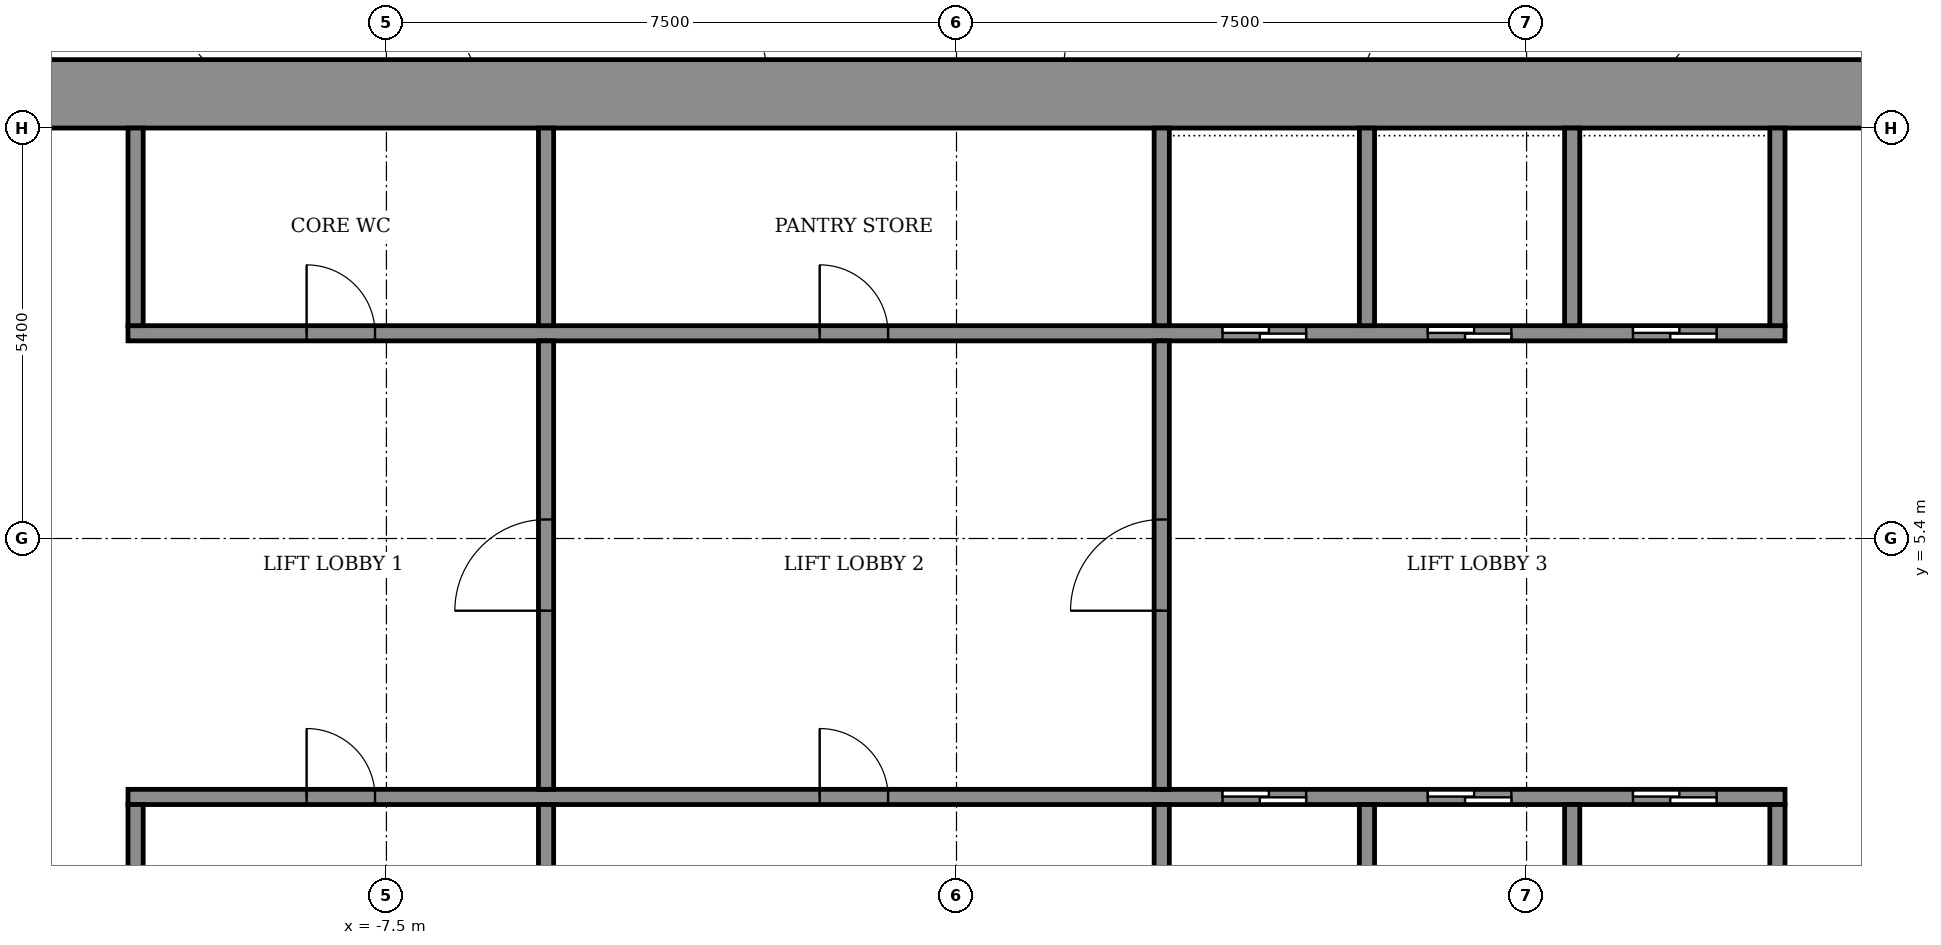
"""IFC4 building model, lengths in metres.
Left out: names, types, materials, properties, quantities, classifications, styles, units other than length and angle.
Written with IfcOpenShell. Run it as: python <this file> out.ifc"""

import sys

from ifc_helpers import new_model, si_unit, direction, frame, frame_2d, origin, place, context, subcontext, project, spatial, rectangle, extrude, element, fill, save


model = new_model("IFC4")
c1 = context("Model", 3, precision=1e-05, world=origin(), true_north=direction((0.0, 1.0)))
c2 = subcontext(c1, "Body", "Model", "MODEL_VIEW")
j1 = project(units=[si_unit("LENGTHUNIT", "METRE"), si_unit("PLANEANGLEUNIT", "RADIAN")], contexts=[c1])
p1 = place(None, origin())
s1 = spatial("IfcSite", under=j1, at=p1, CompositionType="ELEMENT")
p2 = place(p1, origin())
s2 = spatial("IfcBuilding", under=s1, at=p2, CompositionType="ELEMENT")
p3 = place(p2, frame((0.0, 0.0, 148.1)))
s3 = spatial("IfcBuildingStorey", under=s2, at=p3, CompositionType="ELEMENT", Elevation=148.1)
p4 = place(p3, frame((-14.7, 11.25, 0.0), z_axis=(0.0, 0.0, 1.0), x_axis=(1.0, 0.0, 0.0)))
e1 = element("IfcWall", 1, at=p4, inside=s3, PredefinedType="SHEAR", context=c2, shape_type="SweptSolid", body=[
    extrude(rectangle(XDim=29.4, YDim=0.9, at=frame_2d((14.7, 0.0))), origin(), (0.0, 0.0, 1.0), 4.6),
])
p5 = place(p3, frame((-10.9, 2.0, 0.0), z_axis=(0.0, 0.0, 1.0), x_axis=(1.0, 0.0, 0.0)))
e2 = element("IfcWall", 2, at=p5, inside=s3, PredefinedType="SHEAR", context=c2, shape_type="SweptSolid", body=[
    extrude(rectangle(XDim=21.8, YDim=0.2, at=frame_2d((10.9, 0.0))), origin(), (0.0, 0.0, 1.0), 4.05),
])
p6 = place(p5, frame((14.4, 0.0, 0.0)))
e3 = element("IfcOpeningElement", 3, at=p6, cuts=e2, PredefinedType="OPENING", context=c2, shape_type="SweptSolid", body=[
    extrude(rectangle(XDim=1.1, YDim=2.1, at=frame_2d((0.55, 1.05))), frame((0.0, 0.11, 0.0), z_axis=(0.0, -1.0, 0.0), x_axis=(1.0, 0.0, 0.0)), (0.0, 0.0, 1.0), 0.22),
])
p7 = place(p5, frame((17.1, 0.0, 0.0)))
e4 = element("IfcOpeningElement", 4, at=p7, cuts=e2, PredefinedType="OPENING", context=c2, shape_type="SweptSolid", body=[
    extrude(rectangle(XDim=1.1, YDim=2.1, at=frame_2d((0.55, 1.05))), frame((0.0, 0.11, 0.0), z_axis=(0.0, -1.0, 0.0), x_axis=(1.0, 0.0, 0.0)), (0.0, 0.0, 1.0), 0.22),
])
p8 = place(p5, frame((19.8, 0.0, 0.0)))
e5 = element("IfcOpeningElement", 5, at=p8, cuts=e2, PredefinedType="OPENING", context=c2, shape_type="SweptSolid", body=[
    extrude(rectangle(XDim=1.1, YDim=2.1, at=frame_2d((0.55, 1.05))), frame((0.0, 0.11, 0.0), z_axis=(0.0, -1.0, 0.0), x_axis=(1.0, 0.0, 0.0)), (0.0, 0.0, 1.0), 0.22),
])
p9 = place(p5, frame((2.35, 0.0, 0.0)))
e6 = element("IfcOpeningElement", 6, at=p9, cuts=e2, PredefinedType="OPENING", context=c2, shape_type="SweptSolid", body=[
    extrude(rectangle(XDim=0.9, YDim=2.1, at=frame_2d((0.45, 1.05))), frame((0.0, 0.11, 0.0), z_axis=(0.0, -1.0, 0.0), x_axis=(1.0, 0.0, 0.0)), (0.0, 0.0, 1.0), 0.22),
])
p10 = place(p5, frame((9.1, 0.0, 0.0)))
e7 = element("IfcOpeningElement", 7, at=p10, cuts=e2, PredefinedType="OPENING", context=c2, shape_type="SweptSolid", body=[
    extrude(rectangle(XDim=0.9, YDim=2.1, at=frame_2d((0.45, 1.05))), frame((0.0, 0.11, 0.0), z_axis=(0.0, -1.0, 0.0), x_axis=(1.0, 0.0, 0.0)), (0.0, 0.0, 1.0), 0.22),
])
p11 = place(p3, frame((-10.9, 8.1, 0.0), z_axis=(0.0, 0.0, 1.0), x_axis=(1.0, 0.0, 0.0)))
e8 = element("IfcWall", 8, at=p11, inside=s3, PredefinedType="SHEAR", context=c2, shape_type="SweptSolid", body=[
    extrude(rectangle(XDim=21.8, YDim=0.2, at=frame_2d((10.9, 0.0))), origin(), (0.0, 0.0, 1.0), 4.05),
])
p12 = place(p11, frame((14.4, 0.0, 0.0)))
e9 = element("IfcOpeningElement", 9, at=p12, cuts=e8, PredefinedType="OPENING", context=c2, shape_type="SweptSolid", body=[
    extrude(rectangle(XDim=1.1, YDim=2.1, at=frame_2d((0.55, 1.05))), frame((0.0, 0.11, 0.0), z_axis=(0.0, -1.0, 0.0), x_axis=(1.0, 0.0, 0.0)), (0.0, 0.0, 1.0), 0.22),
])
p13 = place(p11, frame((17.1, 0.0, 0.0)))
e10 = element("IfcOpeningElement", 10, at=p13, cuts=e8, PredefinedType="OPENING", context=c2, shape_type="SweptSolid", body=[
    extrude(rectangle(XDim=1.1, YDim=2.1, at=frame_2d((0.55, 1.05))), frame((0.0, 0.11, 0.0), z_axis=(0.0, -1.0, 0.0), x_axis=(1.0, 0.0, 0.0)), (0.0, 0.0, 1.0), 0.22),
])
p14 = place(p11, frame((19.8, 0.0, 0.0)))
e11 = element("IfcOpeningElement", 11, at=p14, cuts=e8, PredefinedType="OPENING", context=c2, shape_type="SweptSolid", body=[
    extrude(rectangle(XDim=1.1, YDim=2.1, at=frame_2d((0.55, 1.05))), frame((0.0, 0.11, 0.0), z_axis=(0.0, -1.0, 0.0), x_axis=(1.0, 0.0, 0.0)), (0.0, 0.0, 1.0), 0.22),
])
p15 = place(p11, frame((2.35, 0.0, 0.0)))
e12 = element("IfcOpeningElement", 12, at=p15, cuts=e8, PredefinedType="OPENING", context=c2, shape_type="SweptSolid", body=[
    extrude(rectangle(XDim=0.9, YDim=2.1, at=frame_2d((0.45, 1.05))), frame((0.0, 0.11, 0.0), z_axis=(0.0, -1.0, 0.0), x_axis=(1.0, 0.0, 0.0)), (0.0, 0.0, 1.0), 0.22),
])
p16 = place(p11, frame((9.1, 0.0, 0.0)))
e13 = element("IfcOpeningElement", 13, at=p16, cuts=e8, PredefinedType="OPENING", context=c2, shape_type="SweptSolid", body=[
    extrude(rectangle(XDim=0.9, YDim=2.1, at=frame_2d((0.45, 1.05))), frame((0.0, 0.11, 0.0), z_axis=(0.0, -1.0, 0.0), x_axis=(1.0, 0.0, 0.0)), (0.0, 0.0, 1.0), 0.22),
])
for number, where, z_axis, x_axis in (
    (14, (-10.8, -0.6, 0.0), (0.0, 0.0, 1.0), (0.0, 1.0, 0.0)),
    (15, (-5.4, -0.6, 0.0), (0.0, 0.0, 1.0), (0.0, 1.0, 0.0)),
):
    element("IfcWall", number, at=place(p3, frame(where, z_axis=z_axis, x_axis=x_axis)), inside=s3, PredefinedType="STANDARD", context=c2, shape_type="SweptSolid", body=[
        extrude(rectangle(XDim=2.5, YDim=0.2, at=frame_2d((1.25, 0.0))), origin(), (0.0, 0.0, 1.0), 4.05),
    ])
for number, where, z_axis, x_axis in (
    (16, (2.7, -0.6, 0.0), (0.0, 0.0, 1.0), (0.0, 1.0, 0.0)),
    (17, (5.4, -0.6, 0.0), (0.0, 0.0, 1.0), (0.0, 1.0, 0.0)),
    (18, (8.1, -0.6, 0.0), (0.0, 0.0, 1.0), (0.0, 1.0, 0.0)),
    (19, (10.8, -0.6, 0.0), (0.0, 0.0, 1.0), (0.0, 1.0, 0.0)),
):
    element("IfcWall", number, at=place(p3, frame(where, z_axis=z_axis, x_axis=x_axis)), inside=s3, PredefinedType="SHEAR", context=c2, shape_type="SweptSolid", body=[
        extrude(rectangle(XDim=2.5, YDim=0.2, at=frame_2d((1.25, 0.0))), origin(), (0.0, 0.0, 1.0), 4.05),
    ])
for number, where, z_axis, x_axis in (
    (20, (-10.8, 8.2, 0.0), (0.0, 0.0, 1.0), (0.0, 1.0, 0.0)),
    (21, (-5.4, 8.2, 0.0), (0.0, 0.0, 1.0), (0.0, 1.0, 0.0)),
):
    element("IfcWall", number, at=place(p3, frame(where, z_axis=z_axis, x_axis=x_axis)), inside=s3, PredefinedType="STANDARD", context=c2, shape_type="SweptSolid", body=[
        extrude(rectangle(XDim=2.6, YDim=0.2, at=frame_2d((1.3, 0.0))), origin(), (0.0, 0.0, 1.0), 4.05),
    ])
for number, where, z_axis, x_axis in (
    (22, (2.7, 8.2, 0.0), (0.0, 0.0, 1.0), (0.0, 1.0, 0.0)),
    (23, (5.4, 8.2, 0.0), (0.0, 0.0, 1.0), (0.0, 1.0, 0.0)),
    (24, (8.1, 8.2, 0.0), (0.0, 0.0, 1.0), (0.0, 1.0, 0.0)),
    (25, (10.8, 8.2, 0.0), (0.0, 0.0, 1.0), (0.0, 1.0, 0.0)),
):
    element("IfcWall", number, at=place(p3, frame(where, z_axis=z_axis, x_axis=x_axis)), inside=s3, PredefinedType="SHEAR", context=c2, shape_type="SweptSolid", body=[
        extrude(rectangle(XDim=2.6, YDim=0.2, at=frame_2d((1.3, 0.0))), origin(), (0.0, 0.0, 1.0), 4.05),
    ])
p17 = place(p3, frame((-5.4, 2.1, 0.0), z_axis=(0.0, 0.0, 1.0), x_axis=(0.0, 1.0, 0.0)))
e26 = element("IfcWall", 26, at=p17, inside=s3, PredefinedType="STANDARD", context=c2, shape_type="SweptSolid", body=[
    extrude(rectangle(XDim=5.9, YDim=0.2, at=frame_2d((2.95, 0.0))), origin(), (0.0, 0.0, 1.0), 4.05),
])
p18 = place(p17, frame((2.35, 0.0, 0.0)))
e27 = element("IfcOpeningElement", 27, at=p18, cuts=e26, PredefinedType="OPENING", context=c2, shape_type="SweptSolid", body=[
    extrude(rectangle(XDim=1.2, YDim=2.1, at=frame_2d((0.6, 1.05))), frame((0.0, 0.11, 0.0), z_axis=(0.0, -1.0, 0.0), x_axis=(1.0, 0.0, 0.0)), (0.0, 0.0, 1.0), 0.22),
])
p19 = place(p3, frame((2.7, 2.1, 0.0), z_axis=(0.0, 0.0, 1.0), x_axis=(0.0, 1.0, 0.0)))
e28 = element("IfcWall", 28, at=p19, inside=s3, PredefinedType="STANDARD", context=c2, shape_type="SweptSolid", body=[
    extrude(rectangle(XDim=5.9, YDim=0.2, at=frame_2d((2.95, 0.0))), origin(), (0.0, 0.0, 1.0), 4.05),
])
p20 = place(p19, frame((2.35, 0.0, 0.0)))
e29 = element("IfcOpeningElement", 29, at=p20, cuts=e28, PredefinedType="OPENING", context=c2, shape_type="SweptSolid", body=[
    extrude(rectangle(XDim=1.2, YDim=2.1, at=frame_2d((0.6, 1.05))), frame((0.0, 0.11, 0.0), z_axis=(0.0, -1.0, 0.0), x_axis=(1.0, 0.0, 0.0)), (0.0, 0.0, 1.0), 0.22),
])
p21 = place(p6, origin())
e30 = element("IfcDoor", 30, at=p21, inside=s3, OperationType="SLIDING_TO_LEFT", PredefinedType="DOOR", context=c2, shape_type="SweptSolid", body=[
    extrude(rectangle(XDim=1.1, YDim=2.1, at=frame_2d((0.55, 1.05))), frame((0.0, 0.025, 0.0), z_axis=(0.0, -1.0, 0.0), x_axis=(1.0, 0.0, 0.0)), (0.0, 0.0, 1.0), 0.05),
])
fill(e3, e30)
p22 = place(p7, origin())
e31 = element("IfcDoor", 31, at=p22, inside=s3, OperationType="SLIDING_TO_LEFT", PredefinedType="DOOR", context=c2, shape_type="SweptSolid", body=[
    extrude(rectangle(XDim=1.1, YDim=2.1, at=frame_2d((0.55, 1.05))), frame((0.0, 0.025, 0.0), z_axis=(0.0, -1.0, 0.0), x_axis=(1.0, 0.0, 0.0)), (0.0, 0.0, 1.0), 0.05),
])
fill(e4, e31)
p23 = place(p8, origin())
e32 = element("IfcDoor", 32, at=p23, inside=s3, OperationType="SLIDING_TO_LEFT", PredefinedType="DOOR", context=c2, shape_type="SweptSolid", body=[
    extrude(rectangle(XDim=1.1, YDim=2.1, at=frame_2d((0.55, 1.05))), frame((0.0, 0.025, 0.0), z_axis=(0.0, -1.0, 0.0), x_axis=(1.0, 0.0, 0.0)), (0.0, 0.0, 1.0), 0.05),
])
fill(e5, e32)
p24 = place(p12, origin())
e33 = element("IfcDoor", 33, at=p24, inside=s3, OperationType="SLIDING_TO_LEFT", PredefinedType="DOOR", context=c2, shape_type="SweptSolid", body=[
    extrude(rectangle(XDim=1.1, YDim=2.1, at=frame_2d((0.55, 1.05))), frame((0.0, 0.025, 0.0), z_axis=(0.0, -1.0, 0.0), x_axis=(1.0, 0.0, 0.0)), (0.0, 0.0, 1.0), 0.05),
])
fill(e9, e33)
p25 = place(p13, origin())
e34 = element("IfcDoor", 34, at=p25, inside=s3, OperationType="SLIDING_TO_LEFT", PredefinedType="DOOR", context=c2, shape_type="SweptSolid", body=[
    extrude(rectangle(XDim=1.1, YDim=2.1, at=frame_2d((0.55, 1.05))), frame((0.0, 0.025, 0.0), z_axis=(0.0, -1.0, 0.0), x_axis=(1.0, 0.0, 0.0)), (0.0, 0.0, 1.0), 0.05),
])
fill(e10, e34)
p26 = place(p14, origin())
e35 = element("IfcDoor", 35, at=p26, inside=s3, OperationType="SLIDING_TO_LEFT", PredefinedType="DOOR", context=c2, shape_type="SweptSolid", body=[
    extrude(rectangle(XDim=1.1, YDim=2.1, at=frame_2d((0.55, 1.05))), frame((0.0, 0.025, 0.0), z_axis=(0.0, -1.0, 0.0), x_axis=(1.0, 0.0, 0.0)), (0.0, 0.0, 1.0), 0.05),
])
fill(e11, e35)
p27 = place(p9, origin())
e36 = element("IfcDoor", 36, at=p27, inside=s3, OperationType="SINGLE_SWING_LEFT", PredefinedType="DOOR", context=c2, shape_type="SweptSolid", body=[
    extrude(rectangle(XDim=0.9, YDim=2.1, at=frame_2d((0.45, 1.05))), frame((0.0, 0.025, 0.0), z_axis=(0.0, -1.0, 0.0), x_axis=(1.0, 0.0, 0.0)), (0.0, 0.0, 1.0), 0.05),
])
fill(e6, e36)
p28 = place(p10, origin())
e37 = element("IfcDoor", 37, at=p28, inside=s3, OperationType="SINGLE_SWING_LEFT", PredefinedType="DOOR", context=c2, shape_type="SweptSolid", body=[
    extrude(rectangle(XDim=0.9, YDim=2.1, at=frame_2d((0.45, 1.05))), frame((0.0, 0.025, 0.0), z_axis=(0.0, -1.0, 0.0), x_axis=(1.0, 0.0, 0.0)), (0.0, 0.0, 1.0), 0.05),
])
fill(e7, e37)
p29 = place(p15, origin())
e38 = element("IfcDoor", 38, at=p29, inside=s3, OperationType="SINGLE_SWING_RIGHT", PredefinedType="DOOR", context=c2, shape_type="SweptSolid", body=[
    extrude(rectangle(XDim=0.9, YDim=2.1, at=frame_2d((0.45, 1.05))), frame((0.0, 0.025, 0.0), z_axis=(0.0, -1.0, 0.0), x_axis=(1.0, 0.0, 0.0)), (0.0, 0.0, 1.0), 0.05),
])
fill(e12, e38)
p30 = place(p16, origin())
e39 = element("IfcDoor", 39, at=p30, inside=s3, OperationType="SINGLE_SWING_RIGHT", PredefinedType="DOOR", context=c2, shape_type="SweptSolid", body=[
    extrude(rectangle(XDim=0.9, YDim=2.1, at=frame_2d((0.45, 1.05))), frame((0.0, 0.025, 0.0), z_axis=(0.0, -1.0, 0.0), x_axis=(1.0, 0.0, 0.0)), (0.0, 0.0, 1.0), 0.05),
])
fill(e13, e39)
p31 = place(p18, origin())
e40 = element("IfcDoor", 40, at=p31, inside=s3, OperationType="SINGLE_SWING_LEFT", PredefinedType="DOOR", context=c2, shape_type="SweptSolid", body=[
    extrude(rectangle(XDim=1.2, YDim=2.1, at=frame_2d((0.6, 1.05))), frame((0.0, 0.025, 0.0), z_axis=(0.0, -1.0, 0.0), x_axis=(1.0, 0.0, 0.0)), (0.0, 0.0, 1.0), 0.05),
])
fill(e27, e40)
p32 = place(p20, origin())
e41 = element("IfcDoor", 41, at=p32, inside=s3, OperationType="SINGLE_SWING_LEFT", PredefinedType="DOOR", context=c2, shape_type="SweptSolid", body=[
    extrude(rectangle(XDim=1.2, YDim=2.1, at=frame_2d((0.6, 1.05))), frame((0.0, 0.025, 0.0), z_axis=(0.0, -1.0, 0.0), x_axis=(1.0, 0.0, 0.0)), (0.0, 0.0, 1.0), 0.05),
])
fill(e29, e41)
save(model, sys.argv[1])
